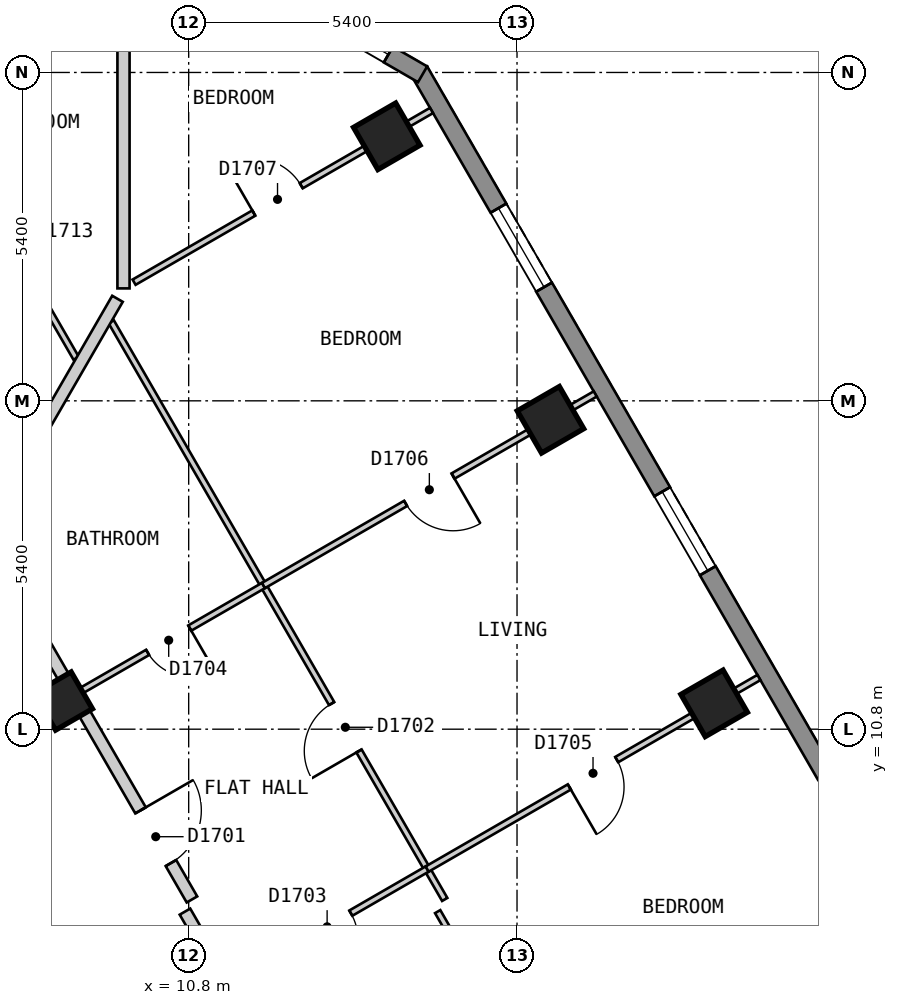
"""IFC4 building model, lengths in metres.
Left out: names, types, materials, properties, quantities, classifications, styles, units other than length and angle.
Written with IfcOpenShell. Run it as: python <this file> out.ifc"""

import sys

from ifc_helpers import new_model, si_unit, direction, frame, frame_2d, origin, origin_2d, place, context, subcontext, project, spatial, polyline, rectangle, outline, extrude, element, fill, save


model = new_model("IFC4")
c1 = context("Model", 3, precision=1e-05, world=origin(), true_north=direction((0.0, 1.0)))
c2 = subcontext(c1, "Body", "Model", "MODEL_VIEW")
j1 = project(units=[si_unit("LENGTHUNIT", "METRE"), si_unit("PLANEANGLEUNIT", "RADIAN")], contexts=[c1])
p1 = place(None, origin())
s1 = spatial("IfcSite", under=j1, at=p1, CompositionType="ELEMENT")
p2 = place(p1, origin())
s2 = spatial("IfcBuilding", under=s1, at=p2, CompositionType="ELEMENT")
p3 = place(p2, frame((0.0, 0.0, 181.2)))
s3 = spatial("IfcBuildingStorey", under=s2, at=p3, CompositionType="ELEMENT", Elevation=181.2)
for number, where, z_axis, x_axis in (
    (1, (19.442, 11.225, 0.0), (0.0, 0.0, 1.0), (-0.5, 0.866, 0.0)),
    (2, (16.75, 15.888, 0.0), (0.0, 0.0, 1.0), (-0.5, 0.866, 0.0)),
    (3, (14.058, 20.55, 0.0), (0.0, 0.0, 1.0), (-0.5, 0.866, 0.0)),
):
    element("IfcColumn", number, at=place(p3, frame(where, z_axis=z_axis, x_axis=x_axis)), inside=s3, PredefinedType="COLUMN", context=c2, shape_type="SweptSolid", body=[
        extrude(rectangle(XDim=0.8, YDim=0.8, at=origin_2d()), origin(), (0.0, 0.0, 1.0), 3.0),
    ])
p4 = place(p3, frame((8.739, 11.263, 0.0), z_axis=(0.0, 0.0, 1.0), x_axis=(-0.5, 0.866025403784, 0.0)))
e4 = element("IfcColumn", 4, at=p4, inside=s3, PredefinedType="COLUMN", context=c2, shape_type="SweptSolid", body=[
    extrude(rectangle(XDim=0.7, YDim=0.7, at=origin_2d()), origin(), (0.0, 0.0, 1.0), 3.0),
])
p5 = place(p3, frame((26.024, 1.825, 0.0), z_axis=(0.0, 0.0, 1.0), x_axis=(-0.500010537973, 0.866019319597, 0.0)))
e5 = element("IfcWall", 5, at=p5, inside=s3, PredefinedType="SOLIDWALL", context=c2, shape_type="SweptSolid", body=[
    extrude(outline(polyline([(0.0, -0.15), (22.863, -0.15), (22.783, 0.15), (0.08, 0.15), (0.0, -0.15)])), origin(), (0.0, 0.0, 1.0), 2.7),
])
p6 = place(p5, frame((2.606, 0.0, 0.15)))
e6 = element("IfcOpeningElement", 6, at=p6, cuts=e5, PredefinedType="OPENING", context=c2, shape_type="SweptSolid", body=[
    extrude(rectangle(XDim=1.5, YDim=2.1, at=frame_2d((0.75, 1.05))), frame((0.0, 0.16, 0.0), z_axis=(0.0, -1.0, 0.0), x_axis=(1.0, 0.0, 0.0)), (0.0, 0.0, 1.0), 0.32),
])
p7 = place(p5, frame((7.99, 0.0, 0.15)))
e7 = element("IfcOpeningElement", 7, at=p7, cuts=e5, PredefinedType="OPENING", context=c2, shape_type="SweptSolid", body=[
    extrude(rectangle(XDim=1.5, YDim=2.1, at=frame_2d((0.75, 1.05))), frame((0.0, 0.16, 0.0), z_axis=(0.0, -1.0, 0.0), x_axis=(1.0, 0.0, 0.0)), (0.0, 0.0, 1.0), 0.32),
])
p8 = place(p5, frame((13.373, 0.0, 0.15)))
e8 = element("IfcOpeningElement", 8, at=p8, cuts=e5, PredefinedType="OPENING", context=c2, shape_type="SweptSolid", body=[
    extrude(rectangle(XDim=1.5, YDim=2.1, at=frame_2d((0.75, 1.05))), frame((0.0, 0.16, 0.0), z_axis=(0.0, -1.0, 0.0), x_axis=(1.0, 0.0, 0.0)), (0.0, 0.0, 1.0), 0.32),
])
p9 = place(p5, frame((18.758, 0.0, 0.15)))
e9 = element("IfcOpeningElement", 9, at=p9, cuts=e5, PredefinedType="OPENING", context=c2, shape_type="SweptSolid", body=[
    extrude(rectangle(XDim=1.5, YDim=2.1, at=frame_2d((0.75, 1.05))), frame((0.0, 0.16, 0.0), z_axis=(0.0, -1.0, 0.0), x_axis=(1.0, 0.0, 0.0)), (0.0, 0.0, 1.0), 0.32),
])
p10 = place(p3, frame((14.647, 21.57, 0.0), z_axis=(0.0, 0.0, 1.0), x_axis=(-0.866022959057, 0.500004234368, 0.0)))
e10 = element("IfcWall", 10, at=p10, inside=s3, PredefinedType="SOLIDWALL", context=c2, shape_type="SweptSolid", body=[
    extrude(outline(polyline([(0.0, -0.15), (5.0, -0.15), (4.92, 0.15), (0.08, 0.15), (0.0, -0.15)])), origin(), (0.0, 0.0, 1.0), 2.7),
])
p11 = place(p10, frame((0.65, 0.0, 0.15)))
e11 = element("IfcOpeningElement", 11, at=p11, cuts=e10, PredefinedType="OPENING", context=c2, shape_type="SweptSolid", body=[
    extrude(rectangle(XDim=1.2, YDim=2.1, at=frame_2d((0.6, 1.05))), frame((0.0, 0.16, 0.0), z_axis=(0.0, -1.0, 0.0), x_axis=(1.0, 0.0, 0.0)), (0.0, 0.0, 1.0), 0.32),
])
p12 = place(p3, frame((10.739, 7.8, 0.0), z_axis=(0.0, 0.0, 1.0), x_axis=(0.500023726918, -0.866011704609, 0.0)))
e12 = element("IfcWall", 12, at=p12, inside=s3, PredefinedType="PARTITIONING", context=c2, shape_type="SweptSolid", body=[
    extrude(rectangle(XDim=9.47, YDim=0.2, at=frame_2d((4.735, 0.0))), origin(), (0.0, 0.0, 1.0), 2.7),
])
p13 = place(p12, frame((8.168, 0.0, 0.0)))
e13 = element("IfcOpeningElement", 13, at=p13, cuts=e12, PredefinedType="OPENING", context=c2, shape_type="SweptSolid", body=[
    extrude(rectangle(XDim=1.0, YDim=2.1, at=frame_2d((0.5, 1.05))), frame((0.0, 0.11, 0.0), z_axis=(0.0, -1.0, 0.0), x_axis=(1.0, 0.0, 0.0)), (0.0, 0.0, 1.0), 0.22),
])
p14 = place(p3, frame((5.485, 17.3, 0.0), z_axis=(0.0, 0.0, 1.0), x_axis=(0.499965832213, -0.866045129667, 0.0)))
e14 = element("IfcWall", 14, at=p14, inside=s3, PredefinedType="PARTITIONING", context=c2, shape_type="SweptSolid", body=[
    extrude(rectangle(XDim=10.739, YDim=0.2, at=frame_2d((5.369, 0.0))), origin(), (0.0, 0.0, 1.0), 2.7),
])
p15 = place(p14, frame((9.047, 0.0, 0.0)))
e15 = element("IfcOpeningElement", 15, at=p15, cuts=e14, PredefinedType="OPENING", context=c2, shape_type="SweptSolid", body=[
    extrude(rectangle(XDim=1.0, YDim=2.1, at=frame_2d((0.5, 1.05))), frame((0.0, 0.11, 0.0), z_axis=(0.0, -1.0, 0.0), x_axis=(1.0, 0.0, 0.0)), (0.0, 0.0, 1.0), 0.22),
])
p16 = place(p3, frame((7.073, 20.15, 0.0), z_axis=(0.0, 0.0, 1.0), x_axis=(0.499917691695, -0.866072919292, 0.0)))
e16 = element("IfcWall", 16, at=p16, inside=s3, PredefinedType="PARTITIONING", context=c2, shape_type="SweptSolid", body=[
    extrude(rectangle(XDim=3.753, YDim=0.1, at=frame_2d((1.876, 0.0))), origin(), (0.0, 0.0, 1.0), 2.7),
])
p17 = place(p16, frame((0.96, 0.0, 0.0)))
e17 = element("IfcOpeningElement", 17, at=p17, cuts=e16, PredefinedType="OPENING", context=c2, shape_type="SweptSolid", body=[
    extrude(rectangle(XDim=0.8, YDim=2.1, at=frame_2d((0.4, 1.05))), frame((0.0, 0.06, 0.0), z_axis=(0.0, -1.0, 0.0), x_axis=(1.0, 0.0, 0.0)), (0.0, 0.0, 1.0), 0.12),
])
p18 = place(p3, frame((14.895, 7.8, 0.0), z_axis=(0.0, 0.0, 1.0), x_axis=(0.500050787847, -0.865996079421, 0.0)))
e18 = element("IfcWall", 18, at=p18, inside=s3, PredefinedType="PARTITIONING", context=c2, shape_type="SweptSolid", body=[
    extrude(rectangle(XDim=4.591, YDim=0.1, at=frame_2d((2.296, 0.0))), origin(), (0.0, 0.0, 1.0), 2.7),
])
p19 = place(p3, frame((9.526, 17.5, 0.0), z_axis=(0.0, 0.0, 1.0), x_axis=(0.500019134094, -0.866014356428, 0.0)))
e19 = element("IfcWall", 19, at=p19, inside=s3, PredefinedType="PARTITIONING", context=c2, shape_type="SweptSolid", body=[
    extrude(rectangle(XDim=10.97, YDim=0.1, at=frame_2d((5.485, 0.0))), origin(), (0.0, 0.0, 1.0), 2.7),
])
p20 = place(p19, frame((7.25, 0.0, 0.0)))
e20 = element("IfcOpeningElement", 20, at=p20, cuts=e19, PredefinedType="OPENING", context=c2, shape_type="SweptSolid", body=[
    extrude(rectangle(XDim=0.9, YDim=2.1, at=frame_2d((0.45, 1.05))), frame((0.0, 0.06, 0.0), z_axis=(0.0, -1.0, 0.0), x_axis=(1.0, 0.0, 0.0)), (0.0, 0.0, 1.0), 0.12),
])
p21 = place(p3, frame((11.518, 6.65, 0.0), z_axis=(0.0, 0.0, 1.0), x_axis=(0.865984470368, 0.500070892056, 0.0)))
e21 = element("IfcWall", 21, at=p21, inside=s3, PredefinedType="PARTITIONING", context=c2, shape_type="SweptSolid", body=[
    extrude(rectangle(XDim=3.7, YDim=0.1, at=frame_2d((1.85, 0.0))), origin(), (0.0, 0.0, 1.0), 2.7),
])
p22 = place(p21, frame((1.35, 0.0, 0.0)))
e22 = element("IfcOpeningElement", 22, at=p22, cuts=e21, PredefinedType="OPENING", context=c2, shape_type="SweptSolid", body=[
    extrude(rectangle(XDim=0.9, YDim=2.1, at=frame_2d((0.45, 1.05))), frame((0.0, 0.06, 0.0), z_axis=(0.0, -1.0, 0.0), x_axis=(1.0, 0.0, 0.0)), (0.0, 0.0, 1.0), 0.12),
])
p23 = place(p3, frame((8.999, 11.413, 0.0), z_axis=(0.0, 0.0, 1.0), x_axis=(0.866019471182, 0.500010275428, 0.0)))
e23 = element("IfcWall", 23, at=p23, inside=s3, PredefinedType="PARTITIONING", context=c2, shape_type="SweptSolid", body=[
    extrude(rectangle(XDim=3.5, YDim=0.1, at=frame_2d((1.75, 0.0))), origin(), (0.0, 0.0, 1.0), 2.7),
])
p24 = place(p23, frame((1.3, 0.0, 0.0)))
e24 = element("IfcOpeningElement", 24, at=p24, cuts=e23, PredefinedType="OPENING", context=c2, shape_type="SweptSolid", body=[
    extrude(rectangle(XDim=0.8, YDim=2.1, at=frame_2d((0.4, 1.05))), frame((0.0, 0.06, 0.0), z_axis=(0.0, -1.0, 0.0), x_axis=(1.0, 0.0, 0.0)), (0.0, 0.0, 1.0), 0.12),
])
p25 = place(p3, frame((9.902, 18.151, 0.0), z_axis=(0.0, 0.0, 1.0), x_axis=(0.866032278734, 0.499988092049, 0.0)))
e25 = element("IfcWall", 25, at=p25, inside=s3, PredefinedType="PARTITIONING", context=c2, shape_type="SweptSolid", body=[
    extrude(rectangle(XDim=5.649, YDim=0.1, at=frame_2d((2.824, 0.0))), origin(), (0.0, 0.0, 1.0), 2.7),
])
p26 = place(p25, frame((2.274, 0.0, 0.0)))
e26 = element("IfcOpeningElement", 26, at=p26, cuts=e25, PredefinedType="OPENING", context=c2, shape_type="SweptSolid", body=[
    extrude(rectangle(XDim=0.9, YDim=2.1, at=frame_2d((0.45, 1.05))), frame((0.0, 0.06, 0.0), z_axis=(0.0, -1.0, 0.0), x_axis=(1.0, 0.0, 0.0)), (0.0, 0.0, 1.0), 0.12),
])
p27 = place(p3, frame((7.448, 14.1, 0.0), z_axis=(0.0, 0.0, 1.0), x_axis=(0.499961462843, 0.866047652079, 0.0)))
e27 = element("IfcWall", 27, at=p27, inside=s3, PredefinedType="PARTITIONING", context=c2, shape_type="SweptSolid", body=[
    extrude(rectangle(XDim=4.362, YDim=0.2, at=frame_2d((2.181, 0.0))), origin(), (0.0, 0.0, 1.0), 2.7),
])
p28 = place(p3, frame((9.728, 18.049, 0.0), z_axis=(0.0, 0.0, 1.0), x_axis=(0.0, 1.0, 0.0)))
e28 = element("IfcWall", 28, at=p28, inside=s3, PredefinedType="PARTITIONING", context=c2, shape_type="SweptSolid", body=[
    extrude(rectangle(XDim=5.851, YDim=0.2, at=frame_2d((2.925, 0.0))), origin(), (0.0, 0.0, 1.0), 2.7),
])
p29 = place(p3, frame((14.722, 8.5, 0.0), z_axis=(0.0, 0.0, 1.0), x_axis=(0.866035871367, 0.499981869177, 0.0)))
e29 = element("IfcWall", 29, at=p29, inside=s3, PredefinedType="PARTITIONING", context=c2, shape_type="SweptSolid", body=[
    extrude(rectangle(XDim=6.3, YDim=0.1, at=frame_2d((3.15, 0.0))), origin(), (0.0, 0.0, 1.0), 2.7),
])
p30 = place(p29, frame((2.7, 0.0, 0.0)))
e30 = element("IfcOpeningElement", 30, at=p30, cuts=e29, PredefinedType="OPENING", context=c2, shape_type="SweptSolid", body=[
    extrude(rectangle(XDim=0.9, YDim=2.1, at=frame_2d((0.45, 1.05))), frame((0.0, 0.06, 0.0), z_axis=(0.0, -1.0, 0.0), x_axis=(1.0, 0.0, 0.0)), (0.0, 0.0, 1.0), 0.12),
])
p31 = place(p3, frame((12.03, 13.163, 0.0), z_axis=(0.0, 0.0, 1.0), x_axis=(0.866035871367, 0.499981869177, 0.0)))
e31 = element("IfcWall", 31, at=p31, inside=s3, PredefinedType="PARTITIONING", context=c2, shape_type="SweptSolid", body=[
    extrude(rectangle(XDim=6.3, YDim=0.1, at=frame_2d((3.15, 0.0))), origin(), (0.0, 0.0, 1.0), 2.7),
])
p32 = place(p31, frame((2.7, 0.0, 0.0)))
e32 = element("IfcOpeningElement", 32, at=p32, cuts=e31, PredefinedType="OPENING", context=c2, shape_type="SweptSolid", body=[
    extrude(rectangle(XDim=0.9, YDim=2.1, at=frame_2d((0.45, 1.05))), frame((0.0, 0.06, 0.0), z_axis=(0.0, -1.0, 0.0), x_axis=(1.0, 0.0, 0.0)), (0.0, 0.0, 1.0), 0.12),
])
p33 = place(p8, origin())
e33 = element("IfcWindow", 33, at=p33, inside=s3, PartitioningType="SINGLE_PANEL", PredefinedType="WINDOW", context=c2, shape_type="SweptSolid", body=[
    extrude(rectangle(XDim=1.5, YDim=2.1, at=frame_2d((0.75, 1.05))), frame((0.0, 0.03, 0.0), z_axis=(0.0, -1.0, 0.0), x_axis=(1.0, 0.0, 0.0)), (0.0, 0.0, 1.0), 0.06),
])
fill(e8, e33)
p34 = place(p9, origin())
e34 = element("IfcWindow", 34, at=p34, inside=s3, PartitioningType="SINGLE_PANEL", PredefinedType="WINDOW", context=c2, shape_type="SweptSolid", body=[
    extrude(rectangle(XDim=1.5, YDim=2.1, at=frame_2d((0.75, 1.05))), frame((0.0, 0.03, 0.0), z_axis=(0.0, -1.0, 0.0), x_axis=(1.0, 0.0, 0.0)), (0.0, 0.0, 1.0), 0.06),
])
fill(e9, e34)
p35 = place(p11, origin())
e35 = element("IfcWindow", 35, at=p35, inside=s3, PartitioningType="SINGLE_PANEL", PredefinedType="WINDOW", context=c2, shape_type="SweptSolid", body=[
    extrude(rectangle(XDim=1.2, YDim=2.1, at=frame_2d((0.6, 1.05))), frame((0.0, 0.03, 0.0), z_axis=(0.0, -1.0, 0.0), x_axis=(1.0, 0.0, 0.0)), (0.0, 0.0, 1.0), 0.06),
])
fill(e11, e35)
p36 = place(p15, origin())
e36 = element("IfcDoor", 36, at=p36, inside=s3, OperationType="SINGLE_SWING_LEFT", PredefinedType="DOOR", context=c2, shape_type="SweptSolid", body=[
    extrude(rectangle(XDim=1.0, YDim=2.1, at=frame_2d((0.5, 1.05))), frame((0.0, 0.025, 0.0), z_axis=(0.0, -1.0, 0.0), x_axis=(1.0, 0.0, 0.0)), (0.0, 0.0, 1.0), 0.05),
])
fill(e15, e36)
p37 = place(p20, origin())
e37 = element("IfcDoor", 37, at=p37, inside=s3, OperationType="SINGLE_SWING_RIGHT", PredefinedType="DOOR", context=c2, shape_type="SweptSolid", body=[
    extrude(rectangle(XDim=0.9, YDim=2.1, at=frame_2d((0.45, 1.05))), frame((0.0, 0.025, 0.0), z_axis=(0.0, -1.0, 0.0), x_axis=(1.0, 0.0, 0.0)), (0.0, 0.0, 1.0), 0.05),
])
fill(e20, e37)
p38 = place(p22, origin())
e38 = element("IfcDoor", 38, at=p38, inside=s3, OperationType="SINGLE_SWING_LEFT", PredefinedType="DOOR", context=c2, shape_type="SweptSolid", body=[
    extrude(rectangle(XDim=0.9, YDim=2.1, at=frame_2d((0.45, 1.05))), frame((0.0, 0.025, 0.0), z_axis=(0.0, -1.0, 0.0), x_axis=(1.0, 0.0, 0.0)), (0.0, 0.0, 1.0), 0.05),
])
fill(e22, e38)
p39 = place(p24, origin())
e39 = element("IfcDoor", 39, at=p39, inside=s3, OperationType="SINGLE_SWING_RIGHT", PredefinedType="DOOR", context=c2, shape_type="SweptSolid", body=[
    extrude(rectangle(XDim=0.8, YDim=2.1, at=frame_2d((0.4, 1.05))), frame((0.0, 0.025, 0.0), z_axis=(0.0, -1.0, 0.0), x_axis=(1.0, 0.0, 0.0)), (0.0, 0.0, 1.0), 0.05),
])
fill(e24, e39)
p40 = place(p30, origin())
e40 = element("IfcDoor", 40, at=p40, inside=s3, OperationType="SINGLE_SWING_LEFT", PredefinedType="DOOR", context=c2, shape_type="SweptSolid", body=[
    extrude(rectangle(XDim=0.9, YDim=2.1, at=frame_2d((0.45, 1.05))), frame((0.0, 0.025, 0.0), z_axis=(0.0, -1.0, 0.0), x_axis=(1.0, 0.0, 0.0)), (0.0, 0.0, 1.0), 0.05),
])
fill(e30, e40)
p41 = place(p32, origin())
e41 = element("IfcDoor", 41, at=p41, inside=s3, OperationType="SINGLE_SWING_RIGHT", PredefinedType="DOOR", context=c2, shape_type="SweptSolid", body=[
    extrude(rectangle(XDim=0.9, YDim=2.1, at=frame_2d((0.45, 1.05))), frame((0.0, 0.025, 0.0), z_axis=(0.0, -1.0, 0.0), x_axis=(1.0, 0.0, 0.0)), (0.0, 0.0, 1.0), 0.05),
])
fill(e32, e41)
p42 = place(p26, origin())
e42 = element("IfcDoor", 42, at=p42, inside=s3, OperationType="SINGLE_SWING_LEFT", PredefinedType="DOOR", context=c2, shape_type="SweptSolid", body=[
    extrude(rectangle(XDim=0.9, YDim=2.1, at=frame_2d((0.45, 1.05))), frame((0.0, 0.025, 0.0), z_axis=(0.0, -1.0, 0.0), x_axis=(1.0, 0.0, 0.0)), (0.0, 0.0, 1.0), 0.05),
])
fill(e26, e42)
save(model, sys.argv[1])
